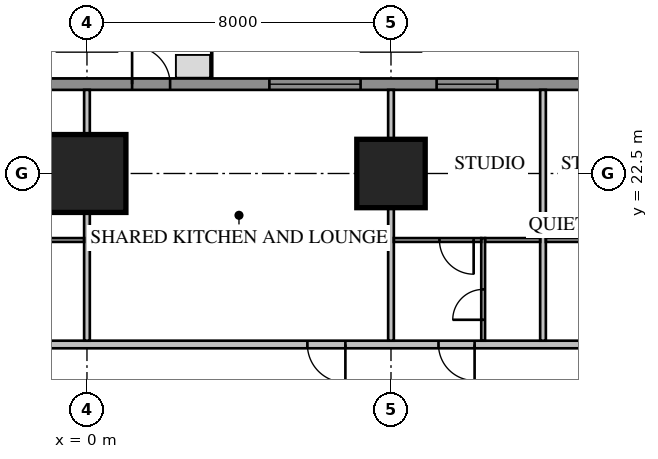
"""IFC4 building model, lengths in metres.
Left out: names, types, materials, properties, quantities, classifications, styles, units other than length and angle.
Written with IfcOpenShell. Run it as: python <this file> out.ifc"""

import sys

from ifc_helpers import new_model, si_unit, direction, frame, frame_2d, origin, origin_2d, place, context, subcontext, project, spatial, rectangle, extrude, element, fill, save


model = new_model("IFC4")
c1 = context("Model", 3, precision=1e-05, world=origin(), true_north=direction((0.0, 1.0)))
c2 = subcontext(c1, "Body", "Model", "MODEL_VIEW")
j1 = project(units=[si_unit("LENGTHUNIT", "METRE"), si_unit("PLANEANGLEUNIT", "RADIAN")], contexts=[c1])
p1 = place(None, origin())
s1 = spatial("IfcSite", under=j1, at=p1, CompositionType="ELEMENT")
p2 = place(p1, origin())
s2 = spatial("IfcBuilding", under=s1, at=p2, CompositionType="ELEMENT")
p3 = place(p2, frame((0.0, 0.0, 19.85)))
s3 = spatial("IfcBuildingStorey", under=s2, at=p3, CompositionType="ELEMENT", Elevation=19.85)
p4 = place(p3, frame((8.0, 22.5, 0.0), z_axis=(0.0, 0.0, 1.0), x_axis=(1.0, 0.0, 0.0)))
e1 = element("IfcColumn", 1, at=p4, inside=s3, PredefinedType="COLUMN", context=c2, shape_type="SweptSolid", body=[
    extrude(rectangle(XDim=1.8, YDim=1.8, at=origin_2d()), origin(), (0.0, 0.0, 1.0), 3.85),
])
p5 = place(p3, frame((0.0, 22.5, 0.0), z_axis=(0.0, 0.0, 1.0), x_axis=(1.0, 0.0, 0.0)))
e2 = element("IfcColumn", 2, at=p5, inside=s3, PredefinedType="COLUMN", context=c2, shape_type="SweptSolid", body=[
    extrude(rectangle(XDim=2.05, YDim=2.05, at=origin_2d()), origin(), (0.0, 0.0, 1.0), 3.85),
])
p6 = place(p3, frame((16.0, 24.85, 0.0), z_axis=(0.0, 0.0, 1.0), x_axis=(-1.0, 0.0, 0.0)))
e3 = element("IfcWall", 3, at=p6, inside=s3, PredefinedType="SOLIDWALL", context=c2, shape_type="SweptSolid", body=[
    extrude(rectangle(XDim=32.0, YDim=0.3, at=frame_2d((16.0, 0.0))), origin(), (0.0, 0.0, 1.0), 3.65),
])
p7 = place(p6, frame((1.2, 0.0, 0.75)))
e4 = element("IfcOpeningElement", 4, at=p7, cuts=e3, PredefinedType="OPENING", context=c2, shape_type="SweptSolid", body=[
    extrude(rectangle(XDim=1.6, YDim=1.8, at=frame_2d((0.8, 0.9))), frame((0.0, 0.17, 0.0), z_axis=(0.0, -1.0, 0.0), x_axis=(1.0, 0.0, 0.0)), (0.0, 0.0, 1.0), 0.34),
])
p8 = place(p6, frame((5.2, 0.0, 0.75)))
e5 = element("IfcOpeningElement", 5, at=p8, cuts=e3, PredefinedType="OPENING", context=c2, shape_type="SweptSolid", body=[
    extrude(rectangle(XDim=1.6, YDim=1.8, at=frame_2d((0.8, 0.9))), frame((0.0, 0.17, 0.0), z_axis=(0.0, -1.0, 0.0), x_axis=(1.0, 0.0, 0.0)), (0.0, 0.0, 1.0), 0.34),
])
p9 = place(p6, frame((17.2, 0.0, 0.75)))
e6 = element("IfcOpeningElement", 6, at=p9, cuts=e3, PredefinedType="OPENING", context=c2, shape_type="SweptSolid", body=[
    extrude(rectangle(XDim=1.6, YDim=1.8, at=frame_2d((0.8, 0.9))), frame((0.0, 0.17, 0.0), z_axis=(0.0, -1.0, 0.0), x_axis=(1.0, 0.0, 0.0)), (0.0, 0.0, 1.0), 0.34),
])
p10 = place(p6, frame((21.2, 0.0, 0.75)))
e7 = element("IfcOpeningElement", 7, at=p10, cuts=e3, PredefinedType="OPENING", context=c2, shape_type="SweptSolid", body=[
    extrude(rectangle(XDim=1.6, YDim=1.8, at=frame_2d((0.8, 0.9))), frame((0.0, 0.17, 0.0), z_axis=(0.0, -1.0, 0.0), x_axis=(1.0, 0.0, 0.0)), (0.0, 0.0, 1.0), 0.34),
])
p11 = place(p6, frame((25.2, 0.0, 0.75)))
e8 = element("IfcOpeningElement", 8, at=p11, cuts=e3, PredefinedType="OPENING", context=c2, shape_type="SweptSolid", body=[
    extrude(rectangle(XDim=1.6, YDim=1.8, at=frame_2d((0.8, 0.9))), frame((0.0, 0.17, 0.0), z_axis=(0.0, -1.0, 0.0), x_axis=(1.0, 0.0, 0.0)), (0.0, 0.0, 1.0), 0.34),
])
p12 = place(p6, frame((29.2, 0.0, 0.75)))
e9 = element("IfcOpeningElement", 9, at=p12, cuts=e3, PredefinedType="OPENING", context=c2, shape_type="SweptSolid", body=[
    extrude(rectangle(XDim=1.6, YDim=1.8, at=frame_2d((0.8, 0.9))), frame((0.0, 0.17, 0.0), z_axis=(0.0, -1.0, 0.0), x_axis=(1.0, 0.0, 0.0)), (0.0, 0.0, 1.0), 0.34),
])
p13 = place(p6, frame((8.8, 0.0, 0.75)))
e10 = element("IfcOpeningElement", 10, at=p13, cuts=e3, PredefinedType="OPENING", context=c2, shape_type="SweptSolid", body=[
    extrude(rectangle(XDim=2.4, YDim=1.8, at=frame_2d((1.2, 0.9))), frame((0.0, 0.17, 0.0), z_axis=(0.0, -1.0, 0.0), x_axis=(1.0, 0.0, 0.0)), (0.0, 0.0, 1.0), 0.34),
])
p14 = place(p6, frame((13.812, 0.0, 0.0)))
e11 = element("IfcOpeningElement", 11, at=p14, cuts=e3, PredefinedType="OPENING", context=c2, shape_type="SweptSolid", body=[
    extrude(rectangle(XDim=1.0, YDim=2.4, at=frame_2d((0.5, 1.2))), frame((0.0, 0.17, 0.0), z_axis=(0.0, -1.0, 0.0), x_axis=(1.0, 0.0, 0.0)), (0.0, 0.0, 1.0), 0.34),
])
p15 = place(p3, frame((18.0, 18.0, 0.0), z_axis=(0.0, 0.0, 1.0), x_axis=(-1.0, 0.0, 0.0)))
e12 = element("IfcWall", 12, at=p15, inside=s3, PredefinedType="PARTITIONING", context=c2, shape_type="SweptSolid", body=[
    extrude(rectangle(XDim=36.0, YDim=0.2, at=frame_2d((18.0, 0.0))), origin(), (0.0, 0.0, 1.0), 3.65),
])
p16 = place(p15, frame((0.375, 0.0, 0.0)))
e13 = element("IfcOpeningElement", 13, at=p16, cuts=e12, PredefinedType="OPENING", context=c2, shape_type="SweptSolid", body=[
    extrude(rectangle(XDim=1.0, YDim=2.1, at=frame_2d((0.5, 1.05))), frame((0.0, 0.12, 0.0), z_axis=(0.0, -1.0, 0.0), x_axis=(1.0, 0.0, 0.0)), (0.0, 0.0, 1.0), 0.24),
])
p17 = place(p15, frame((3.8, 0.0, 0.0)))
e14 = element("IfcOpeningElement", 14, at=p17, cuts=e12, PredefinedType="OPENING", context=c2, shape_type="SweptSolid", body=[
    extrude(rectangle(XDim=0.95, YDim=2.1, at=frame_2d((0.475, 1.05))), frame((0.0, 0.12, 0.0), z_axis=(0.0, -1.0, 0.0), x_axis=(1.0, 0.0, 0.0)), (0.0, 0.0, 1.0), 0.24),
])
p18 = place(p15, frame((7.8, 0.0, 0.0)))
e15 = element("IfcOpeningElement", 15, at=p18, cuts=e12, PredefinedType="OPENING", context=c2, shape_type="SweptSolid", body=[
    extrude(rectangle(XDim=0.95, YDim=2.1, at=frame_2d((0.475, 1.05))), frame((0.0, 0.12, 0.0), z_axis=(0.0, -1.0, 0.0), x_axis=(1.0, 0.0, 0.0)), (0.0, 0.0, 1.0), 0.24),
])
p19 = place(p15, frame((19.8, 0.0, 0.0)))
e16 = element("IfcOpeningElement", 16, at=p19, cuts=e12, PredefinedType="OPENING", context=c2, shape_type="SweptSolid", body=[
    extrude(rectangle(XDim=0.95, YDim=2.1, at=frame_2d((0.475, 1.05))), frame((0.0, 0.12, 0.0), z_axis=(0.0, -1.0, 0.0), x_axis=(1.0, 0.0, 0.0)), (0.0, 0.0, 1.0), 0.24),
])
p20 = place(p15, frame((23.8, 0.0, 0.0)))
e17 = element("IfcOpeningElement", 17, at=p20, cuts=e12, PredefinedType="OPENING", context=c2, shape_type="SweptSolid", body=[
    extrude(rectangle(XDim=0.95, YDim=2.1, at=frame_2d((0.475, 1.05))), frame((0.0, 0.12, 0.0), z_axis=(0.0, -1.0, 0.0), x_axis=(1.0, 0.0, 0.0)), (0.0, 0.0, 1.0), 0.24),
])
p21 = place(p15, frame((27.8, 0.0, 0.0)))
e18 = element("IfcOpeningElement", 18, at=p21, cuts=e12, PredefinedType="OPENING", context=c2, shape_type="SweptSolid", body=[
    extrude(rectangle(XDim=0.95, YDim=2.1, at=frame_2d((0.475, 1.05))), frame((0.0, 0.12, 0.0), z_axis=(0.0, -1.0, 0.0), x_axis=(1.0, 0.0, 0.0)), (0.0, 0.0, 1.0), 0.24),
])
p22 = place(p15, frame((31.8, 0.0, 0.0)))
e19 = element("IfcOpeningElement", 19, at=p22, cuts=e12, PredefinedType="OPENING", context=c2, shape_type="SweptSolid", body=[
    extrude(rectangle(XDim=0.95, YDim=2.1, at=frame_2d((0.475, 1.05))), frame((0.0, 0.12, 0.0), z_axis=(0.0, -1.0, 0.0), x_axis=(1.0, 0.0, 0.0)), (0.0, 0.0, 1.0), 0.24),
])
p23 = place(p15, frame((34.375, 0.0, 0.0)))
e20 = element("IfcOpeningElement", 20, at=p23, cuts=e12, PredefinedType="OPENING", context=c2, shape_type="SweptSolid", body=[
    extrude(rectangle(XDim=0.95, YDim=2.1, at=frame_2d((0.475, 1.05))), frame((0.0, 0.12, 0.0), z_axis=(0.0, -1.0, 0.0), x_axis=(1.0, 0.0, 0.0)), (0.0, 0.0, 1.0), 0.24),
])
p24 = place(p15, frame((11.2, 0.0, 0.0)))
e21 = element("IfcOpeningElement", 21, at=p24, cuts=e12, PredefinedType="OPENING", context=c2, shape_type="SweptSolid", body=[
    extrude(rectangle(XDim=1.0, YDim=2.1, at=frame_2d((0.5, 1.05))), frame((0.0, 0.12, 0.0), z_axis=(0.0, -1.0, 0.0), x_axis=(1.0, 0.0, 0.0)), (0.0, 0.0, 1.0), 0.24),
])
for number, where, z_axis, x_axis in (
    (22, (12.0, 18.1, 0.0), (0.0, 0.0, 1.0), (0.0, 1.0, 0.0)),
    (23, (8.0, 18.1, 0.0), (0.0, 0.0, 1.0), (0.0, 1.0, 0.0)),
):
    element("IfcWall", number, at=place(p3, frame(where, z_axis=z_axis, x_axis=x_axis)), inside=s3, PredefinedType="PARTITIONING", context=c2, shape_type="SweptSolid", body=[
        extrude(rectangle(XDim=6.6, YDim=0.15, at=frame_2d((3.3, 0.0))), origin(), (0.0, 0.0, 1.0), 3.65),
    ])
p25 = place(p3, frame((0.0, 18.1, 0.0), z_axis=(0.0, 0.0, 1.0), x_axis=(0.0, 1.0, 0.0)))
e24 = element("IfcWall", 24, at=p25, inside=s3, PredefinedType="PARTITIONING", context=c2, shape_type="SweptSolid", body=[
    extrude(rectangle(XDim=6.6, YDim=0.15, at=frame_2d((3.3, 0.0))), origin(), (0.0, 0.0, 1.0), 2.809),
])
p26 = place(p3, frame((10.425, 18.1, 0.0), z_axis=(0.0, 0.0, 1.0), x_axis=(0.0, 1.0, 0.0)))
e25 = element("IfcWall", 25, at=p26, inside=s3, PredefinedType="PARTITIONING", context=c2, shape_type="SweptSolid", body=[
    extrude(rectangle(XDim=2.7, YDim=0.1, at=frame_2d((1.35, 0.0))), origin(), (0.0, 0.0, 1.0), 3.65),
])
p27 = place(p26, frame((0.55, 0.0, 0.0)))
e26 = element("IfcOpeningElement", 26, at=p27, cuts=e25, PredefinedType="OPENING", context=c2, shape_type="SweptSolid", body=[
    extrude(rectangle(XDim=0.8, YDim=2.1, at=frame_2d((0.4, 1.05))), frame((0.0, 0.07, 0.0), z_axis=(0.0, -1.0, 0.0), x_axis=(1.0, 0.0, 0.0)), (0.0, 0.0, 1.0), 0.14),
])
for number, where, z_axis, x_axis in (
    (27, (11.925, 20.75, 0.0), (0.0, 0.0, 1.0), (-1.0, 0.0, 0.0)),
    (28, (-0.075, 20.75, 0.0), (0.0, 0.0, 1.0), (-1.0, 0.0, 0.0)),
):
    element("IfcWall", number, at=place(p3, frame(where, z_axis=z_axis, x_axis=x_axis)), inside=s3, PredefinedType="PARTITIONING", context=c2, shape_type="SweptSolid", body=[
        extrude(rectangle(XDim=1.45, YDim=0.1, at=frame_2d((0.725, 0.0))), origin(), (0.0, 0.0, 1.0), 3.65),
    ])
p28 = place(p3, frame((14.375, 20.75, 0.0), z_axis=(0.0, 0.0, 1.0), x_axis=(-1.0, 0.0, 0.0)))
e29 = element("IfcWall", 29, at=p28, inside=s3, PredefinedType="PARTITIONING", context=c2, shape_type="SweptSolid", body=[
    extrude(rectangle(XDim=2.3, YDim=0.1, at=frame_2d((1.15, 0.0))), origin(), (0.0, 0.0, 1.0), 3.65),
])
p29 = place(p28, frame((0.2, 0.0, 0.0)))
e30 = element("IfcOpeningElement", 30, at=p29, cuts=e29, PredefinedType="OPENING", context=c2, shape_type="SweptSolid", body=[
    extrude(rectangle(XDim=0.9, YDim=2.1, at=frame_2d((0.45, 1.05))), frame((0.0, 0.07, 0.0), z_axis=(0.0, -1.0, 0.0), x_axis=(1.0, 0.0, 0.0)), (0.0, 0.0, 1.0), 0.14),
])
p30 = place(p3, frame((10.375, 20.75, 0.0), z_axis=(0.0, 0.0, 1.0), x_axis=(-1.0, 0.0, 0.0)))
e31 = element("IfcWall", 31, at=p30, inside=s3, PredefinedType="PARTITIONING", context=c2, shape_type="SweptSolid", body=[
    extrude(rectangle(XDim=2.3, YDim=0.1, at=frame_2d((1.15, 0.0))), origin(), (0.0, 0.0, 1.0), 3.65),
])
p31 = place(p30, frame((0.2, 0.0, 0.0)))
e32 = element("IfcOpeningElement", 32, at=p31, cuts=e31, PredefinedType="OPENING", context=c2, shape_type="SweptSolid", body=[
    extrude(rectangle(XDim=0.9, YDim=2.1, at=frame_2d((0.45, 1.05))), frame((0.0, 0.07, 0.0), z_axis=(0.0, -1.0, 0.0), x_axis=(1.0, 0.0, 0.0)), (0.0, 0.0, 1.0), 0.14),
])
p32 = place(p8, origin())
e33 = element("IfcWindow", 33, at=p32, inside=s3, PartitioningType="SINGLE_PANEL", PredefinedType="WINDOW", context=c2, shape_type="SweptSolid", body=[
    extrude(rectangle(XDim=1.6, YDim=1.8, at=frame_2d((0.8, 0.9))), frame((0.0, 0.03, 0.0), z_axis=(0.0, -1.0, 0.0), x_axis=(1.0, 0.0, 0.0)), (0.0, 0.0, 1.0), 0.06),
])
fill(e5, e33)
p33 = place(p13, origin())
e34 = element("IfcWindow", 34, at=p33, inside=s3, PartitioningType="SINGLE_PANEL", PredefinedType="WINDOW", context=c2, shape_type="SweptSolid", body=[
    extrude(rectangle(XDim=2.4, YDim=1.8, at=frame_2d((1.2, 0.9))), frame((0.0, 0.03, 0.0), z_axis=(0.0, -1.0, 0.0), x_axis=(1.0, 0.0, 0.0)), (0.0, 0.0, 1.0), 0.06),
])
fill(e10, e34)
p34 = place(p14, origin())
e35 = element("IfcDoor", 35, at=p34, inside=s3, OperationType="SINGLE_SWING_RIGHT", PredefinedType="DOOR", context=c2, shape_type="SweptSolid", body=[
    extrude(rectangle(XDim=1.0, YDim=2.4, at=frame_2d((0.5, 1.2))), frame((0.0, 0.025, 0.0), z_axis=(0.0, -1.0, 0.0), x_axis=(1.0, 0.0, 0.0)), (0.0, 0.0, 1.0), 0.05),
])
fill(e11, e35)
p35 = place(p18, origin())
e36 = element("IfcDoor", 36, at=p35, inside=s3, OperationType="SINGLE_SWING_LEFT", PredefinedType="DOOR", context=c2, shape_type="SweptSolid", body=[
    extrude(rectangle(XDim=0.95, YDim=2.1, at=frame_2d((0.475, 1.05))), frame((0.0, 0.025, 0.0), z_axis=(0.0, -1.0, 0.0), x_axis=(1.0, 0.0, 0.0)), (0.0, 0.0, 1.0), 0.05),
])
fill(e15, e36)
p36 = place(p27, origin())
e37 = element("IfcDoor", 37, at=p36, inside=s3, OperationType="SINGLE_SWING_LEFT", PredefinedType="DOOR", context=c2, shape_type="SweptSolid", body=[
    extrude(rectangle(XDim=0.8, YDim=2.1, at=frame_2d((0.4, 1.05))), frame((0.0, 0.025, 0.0), z_axis=(0.0, -1.0, 0.0), x_axis=(1.0, 0.0, 0.0)), (0.0, 0.0, 1.0), 0.05),
])
fill(e26, e37)
p37 = place(p24, origin())
e38 = element("IfcDoor", 38, at=p37, inside=s3, OperationType="SINGLE_SWING_LEFT", PredefinedType="DOOR", context=c2, shape_type="SweptSolid", body=[
    extrude(rectangle(XDim=1.0, YDim=2.1, at=frame_2d((0.5, 1.05))), frame((0.0, 0.025, 0.0), z_axis=(0.0, -1.0, 0.0), x_axis=(1.0, 0.0, 0.0)), (0.0, 0.0, 1.0), 0.05),
])
fill(e21, e38)
p38 = place(p31, origin())
e39 = element("IfcDoor", 39, at=p38, inside=s3, OperationType="SINGLE_SWING_LEFT", PredefinedType="DOOR", context=c2, shape_type="SweptSolid", body=[
    extrude(rectangle(XDim=0.9, YDim=2.1, at=frame_2d((0.45, 1.05))), frame((0.0, 0.025, 0.0), z_axis=(0.0, -1.0, 0.0), x_axis=(1.0, 0.0, 0.0)), (0.0, 0.0, 1.0), 0.05),
])
fill(e32, e39)
save(model, sys.argv[1])
